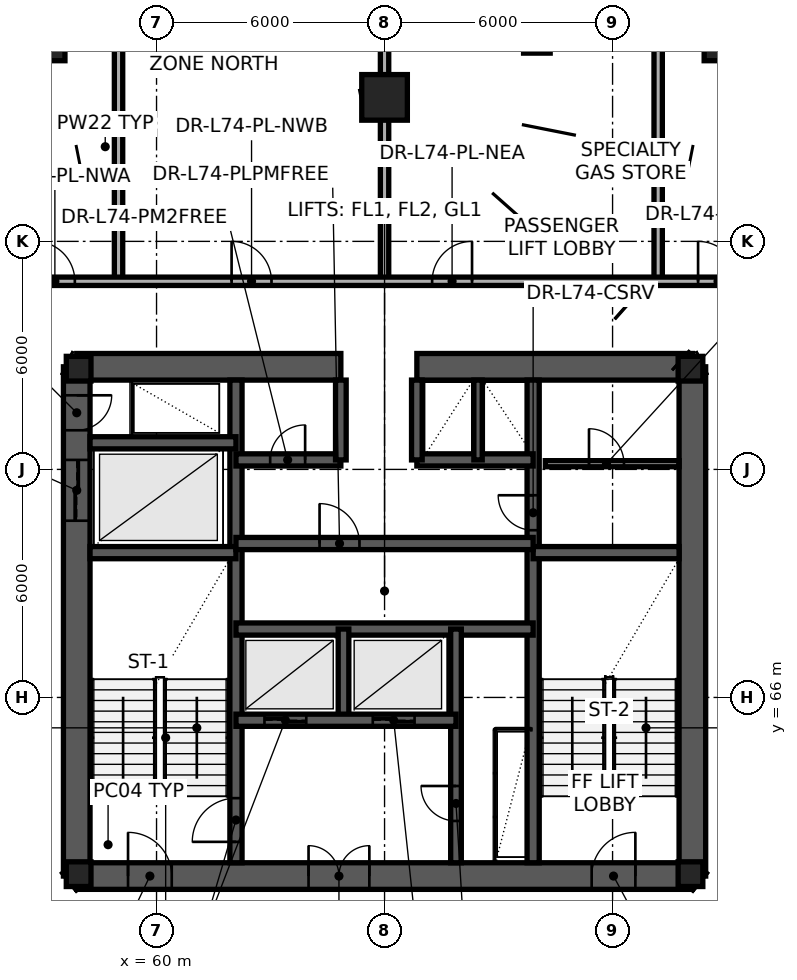
"""IFC4 building model, lengths in metres.
Left out: names, types, materials, properties, quantities, classifications, styles, units other than length and angle.
Written with IfcOpenShell. Run it as: python <this file> out.ifc"""

import sys

from ifc_helpers import new_model, si_unit, direction, frame, frame_2d, origin, origin_2d, place, context, subcontext, project, spatial, rectangle, extrude, element, fill, save


model = new_model("IFC4")
c1 = context("Model", 3, precision=1e-05, world=origin(), true_north=direction((0.0, 1.0)))
c2 = subcontext(c1, "Body", "Model", "MODEL_VIEW")
j1 = project(units=[si_unit("LENGTHUNIT", "METRE"), si_unit("PLANEANGLEUNIT", "RADIAN")], contexts=[c1])
p1 = place(None, origin())
s1 = spatial("IfcSite", under=j1, at=p1, CompositionType="ELEMENT")
p2 = place(p1, origin())
s2 = spatial("IfcBuilding", under=s1, at=p2, CompositionType="ELEMENT")
p3 = place(p2, frame((0.0, 0.0, 279.6)))
s3 = spatial("IfcBuildingStorey", under=s2, at=p3, CompositionType="ELEMENT", Elevation=279.6)
p4 = place(p3, frame((57.9, 61.3, 0.0), z_axis=(0.0, 0.0, 1.0), x_axis=(1.0, 0.0, 0.0)))
e1 = element("IfcWall", 1, at=p4, inside=s3, PredefinedType="SHEAR", context=c2, shape_type="SweptSolid", body=[
    extrude(rectangle(XDim=16.2, YDim=0.7, at=frame_2d((8.1, 0.0))), origin(), (0.0, 0.0, 1.0), 4.2),
])
p5 = place(p4, frame((1.35, 0.0, 0.0)))
e2 = element("IfcOpeningElement", 2, at=p5, cuts=e1, PredefinedType="OPENING", context=c2, shape_type="SweptSolid", body=[
    extrude(rectangle(XDim=1.15, YDim=2.15, at=frame_2d((0.575, 1.075))), frame((0.0, 0.36, 0.0), z_axis=(0.0, -1.0, 0.0), x_axis=(1.0, 0.0, 0.0)), (0.0, 0.0, 1.0), 0.72),
])
p6 = place(p4, frame((6.1, 0.0, 0.0)))
e3 = element("IfcOpeningElement", 3, at=p6, cuts=e1, PredefinedType="OPENING", context=c2, shape_type="SweptSolid", body=[
    extrude(rectangle(XDim=1.6, YDim=2.15, at=frame_2d((0.8, 1.075))), frame((0.0, 0.36, 0.0), z_axis=(0.0, -1.0, 0.0), x_axis=(1.0, 0.0, 0.0)), (0.0, 0.0, 1.0), 0.72),
])
p7 = place(p4, frame((13.55, 0.0, 0.0)))
e4 = element("IfcOpeningElement", 4, at=p7, cuts=e1, PredefinedType="OPENING", context=c2, shape_type="SweptSolid", body=[
    extrude(rectangle(XDim=1.15, YDim=2.15, at=frame_2d((0.575, 1.075))), frame((0.0, 0.36, 0.0), z_axis=(0.0, -1.0, 0.0), x_axis=(1.0, 0.0, 0.0)), (0.0, 0.0, 1.0), 0.72),
])
p8 = place(p3, frame((74.1, 61.3, 0.0), z_axis=(0.0, 0.0, 1.0), x_axis=(0.0, 1.0, 0.0)))
e5 = element("IfcWall", 5, at=p8, inside=s3, PredefinedType="SHEAR", context=c2, shape_type="SweptSolid", body=[
    extrude(rectangle(XDim=13.4, YDim=0.7, at=frame_2d((6.7, 0.0))), origin(), (0.0, 0.0, 1.0), 4.2),
])
p9 = place(p3, frame((74.1, 74.7, 0.0), z_axis=(0.0, 0.0, 1.0), x_axis=(-1.0, 0.0, 0.0)))
e6 = element("IfcWall", 6, at=p9, inside=s3, PredefinedType="SHEAR", context=c2, shape_type="SweptSolid", body=[
    extrude(rectangle(XDim=7.25, YDim=0.7, at=frame_2d((3.625, 0.0))), origin(), (0.0, 0.0, 1.0), 4.2),
])
p10 = place(p3, frame((64.85, 74.7, 0.0), z_axis=(0.0, 0.0, 1.0), x_axis=(-1.0, 0.0, 0.0)))
e7 = element("IfcWall", 7, at=p10, inside=s3, PredefinedType="SHEAR", context=c2, shape_type="SweptSolid", body=[
    extrude(rectangle(XDim=6.95, YDim=0.7, at=frame_2d((3.475, 0.0))), origin(), (0.0, 0.0, 1.0), 4.2),
])
p11 = place(p3, frame((57.9, 74.7, 0.0), z_axis=(0.0, 0.0, 1.0), x_axis=(0.0, -1.0, 0.0)))
e8 = element("IfcWall", 8, at=p11, inside=s3, PredefinedType="SHEAR", context=c2, shape_type="SweptSolid", body=[
    extrude(rectangle(XDim=13.4, YDim=0.7, at=frame_2d((6.7, 0.0))), origin(), (0.0, 0.0, 1.0), 4.2),
])
p12 = place(p11, frame((0.75, 0.0, 0.0)))
e9 = element("IfcOpeningElement", 9, at=p12, cuts=e8, PredefinedType="OPENING", context=c2, shape_type="SweptSolid", body=[
    extrude(rectangle(XDim=0.92, YDim=2.05, at=frame_2d((0.46, 1.025))), frame((0.0, 0.36, 0.0), z_axis=(0.0, -1.0, 0.0), x_axis=(1.0, 0.0, 0.0)), (0.0, 0.0, 1.0), 0.72),
])
p13 = place(p11, frame((2.45, 0.0, 0.0)))
e10 = element("IfcOpeningElement", 10, at=p13, cuts=e8, PredefinedType="OPENING", context=c2, shape_type="SweptSolid", body=[
    extrude(rectangle(XDim=1.6, YDim=2.3, at=frame_2d((0.8, 1.15))), frame((0.0, 0.36, 0.0), z_axis=(0.0, -1.0, 0.0), x_axis=(1.0, 0.0, 0.0)), (0.0, 0.0, 1.0), 0.72),
])
p14 = place(p3, frame((62.09, 61.65, 0.0), z_axis=(0.0, 0.0, 1.0), x_axis=(0.0, 1.0, 0.0)))
e11 = element("IfcWall", 11, at=p14, inside=s3, PredefinedType="SHEAR", context=c2, shape_type="SweptSolid", body=[
    extrude(rectangle(XDim=12.7, YDim=0.32, at=frame_2d((6.35, 0.0))), origin(), (0.0, 0.0, 1.0), 4.2),
])
p15 = place(p14, frame((0.55, 0.0, 0.0)))
e12 = element("IfcOpeningElement", 12, at=p15, cuts=e11, PredefinedType="OPENING", context=c2, shape_type="SweptSolid", body=[
    extrude(rectangle(XDim=1.15, YDim=2.15, at=frame_2d((0.575, 1.075))), frame((0.0, 0.17, 0.0), z_axis=(0.0, -1.0, 0.0), x_axis=(1.0, 0.0, 0.0)), (0.0, 0.0, 1.0), 0.34),
])
p16 = place(p3, frame((69.91, 61.65, 0.0), z_axis=(0.0, 0.0, 1.0), x_axis=(0.0, 1.0, 0.0)))
e13 = element("IfcWall", 13, at=p16, inside=s3, PredefinedType="SHEAR", context=c2, shape_type="SweptSolid", body=[
    extrude(rectangle(XDim=12.7, YDim=0.32, at=frame_2d((6.35, 0.0))), origin(), (0.0, 0.0, 1.0), 4.2),
])
p17 = place(p16, frame((8.75, 0.0, 0.0)))
e14 = element("IfcOpeningElement", 14, at=p17, cuts=e13, PredefinedType="OPENING", context=c2, shape_type="SweptSolid", body=[
    extrude(rectangle(XDim=0.92, YDim=2.05, at=frame_2d((0.46, 1.025))), frame((0.0, 0.17, 0.0), z_axis=(0.0, -1.0, 0.0), x_axis=(1.0, 0.0, 0.0)), (0.0, 0.0, 1.0), 0.34),
])
for number, where, z_axis, x_axis in (
    (15, (58.25, 69.81, 0.0), (0.0, 0.0, 1.0), (1.0, 0.0, 0.0)),
    (16, (69.91, 69.81, 0.0), (0.0, 0.0, 1.0), (1.0, 0.0, 0.0)),
    (17, (58.25, 72.7, 0.0), (0.0, 0.0, 1.0), (1.0, 0.0, 0.0)),
):
    element("IfcWall", number, at=place(p3, frame(where, z_axis=z_axis, x_axis=x_axis)), inside=s3, PredefinedType="SHEAR", context=c2, shape_type="SweptSolid", body=[
        extrude(rectangle(XDim=3.84, YDim=0.32, at=frame_2d((1.92, 0.0))), origin(), (0.0, 0.0, 1.0), 4.2),
    ])
p18 = place(p3, frame((62.09, 67.8, 0.0), z_axis=(0.0, 0.0, 1.0), x_axis=(1.0, 0.0, 0.0)))
e18 = element("IfcWall", 18, at=p18, inside=s3, PredefinedType="SHEAR", context=c2, shape_type="SweptSolid", body=[
    extrude(rectangle(XDim=7.82, YDim=0.32, at=frame_2d((3.91, 0.0))), origin(), (0.0, 0.0, 1.0), 4.2),
])
p19 = place(p3, frame((64.92, 65.4, 0.0), z_axis=(0.0, 0.0, 1.0), x_axis=(0.0, 1.0, 0.0)))
e19 = element("IfcWall", 19, at=p19, inside=s3, PredefinedType="SHEAR", context=c2, shape_type="SweptSolid", body=[
    extrude(rectangle(XDim=2.4, YDim=0.28, at=frame_2d((1.2, 0.0))), origin(), (0.0, 0.0, 1.0), 4.2),
])
p20 = place(p3, frame((62.09, 70.05, 0.0), z_axis=(0.0, 0.0, 1.0), x_axis=(1.0, 0.0, 0.0)))
e20 = element("IfcWall", 20, at=p20, inside=s3, PredefinedType="SHEAR", context=c2, shape_type="SweptSolid", body=[
    extrude(rectangle(XDim=7.82, YDim=0.32, at=frame_2d((3.91, 0.0))), origin(), (0.0, 0.0, 1.0), 4.2),
])
p21 = place(p20, frame((2.2, 0.0, 0.0)))
e21 = element("IfcOpeningElement", 21, at=p21, cuts=e20, PredefinedType="OPENING", context=c2, shape_type="SweptSolid", body=[
    extrude(rectangle(XDim=1.05, YDim=2.15, at=frame_2d((0.525, 1.075))), frame((0.0, 0.17, 0.0), z_axis=(0.0, -1.0, 0.0), x_axis=(1.0, 0.0, 0.0)), (0.0, 0.0, 1.0), 0.34),
])
p22 = place(p3, frame((62.09, 72.25, 0.0), z_axis=(0.0, 0.0, 1.0), x_axis=(1.0, 0.0, 0.0)))
e22 = element("IfcWall", 22, at=p22, inside=s3, PredefinedType="SHEAR", context=c2, shape_type="SweptSolid", body=[
    extrude(rectangle(XDim=2.76, YDim=0.32, at=frame_2d((1.38, 0.0))), origin(), (0.0, 0.0, 1.0), 4.2),
])
p23 = place(p22, frame((0.9, 0.0, 0.0)))
e23 = element("IfcOpeningElement", 23, at=p23, cuts=e22, PredefinedType="OPENING", context=c2, shape_type="SweptSolid", body=[
    extrude(rectangle(XDim=0.92, YDim=2.05, at=frame_2d((0.46, 1.025))), frame((0.0, 0.17, 0.0), z_axis=(0.0, -1.0, 0.0), x_axis=(1.0, 0.0, 0.0)), (0.0, 0.0, 1.0), 0.34),
])
p24 = place(p3, frame((66.85, 72.25, 0.0), z_axis=(0.0, 0.0, 1.0), x_axis=(1.0, 0.0, 0.0)))
e24 = element("IfcWall", 24, at=p24, inside=s3, PredefinedType="SHEAR", context=c2, shape_type="SweptSolid", body=[
    extrude(rectangle(XDim=3.06, YDim=0.32, at=frame_2d((1.53, 0.0))), origin(), (0.0, 0.0, 1.0), 4.2),
])
for number, where, z_axis, x_axis in (
    (25, (64.85, 72.25, 0.0), (0.0, 0.0, 1.0), (0.0, 1.0, 0.0)),
    (26, (66.85, 72.25, 0.0), (0.0, 0.0, 1.0), (0.0, 1.0, 0.0)),
):
    element("IfcWall", number, at=place(p3, frame(where, z_axis=z_axis, x_axis=x_axis)), inside=s3, PredefinedType="SHEAR", context=c2, shape_type="SweptSolid", body=[
        extrude(rectangle(XDim=2.1, YDim=0.28, at=frame_2d((1.05, 0.0))), origin(), (0.0, 0.0, 1.0), 4.2),
    ])
p25 = place(p3, frame((68.46, 72.25, 0.0), z_axis=(0.0, 0.0, 1.0), x_axis=(0.0, 1.0, 0.0)))
e27 = element("IfcWall", 27, at=p25, inside=s3, PredefinedType="SHEAR", context=c2, shape_type="SweptSolid", body=[
    extrude(rectangle(XDim=2.1, YDim=0.22, at=frame_2d((1.05, 0.0))), origin(), (0.0, 0.0, 1.0), 4.2),
])
p26 = place(p3, frame((67.88, 61.65, 0.0), z_axis=(0.0, 0.0, 1.0), x_axis=(0.0, 1.0, 0.0)))
e28 = element("IfcWall", 28, at=p26, inside=s3, PredefinedType="SHEAR", context=c2, shape_type="SweptSolid", body=[
    extrude(rectangle(XDim=6.15, YDim=0.28, at=frame_2d((3.075, 0.0))), origin(), (0.0, 0.0, 1.0), 4.2),
])
p27 = place(p26, frame((1.1, 0.0, 0.0)))
e29 = element("IfcOpeningElement", 29, at=p27, cuts=e28, PredefinedType="OPENING", context=c2, shape_type="SweptSolid", body=[
    extrude(rectangle(XDim=0.92, YDim=2.05, at=frame_2d((0.46, 1.025))), frame((0.0, 0.15, 0.0), z_axis=(0.0, -1.0, 0.0), x_axis=(1.0, 0.0, 0.0)), (0.0, 0.0, 1.0), 0.3),
])
p28 = place(p3, frame((62.09, 65.4, 0.0), z_axis=(0.0, 0.0, 1.0), x_axis=(1.0, 0.0, 0.0)))
e30 = element("IfcWall", 30, at=p28, inside=s3, PredefinedType="SHEAR", context=c2, shape_type="SweptSolid", body=[
    extrude(rectangle(XDim=5.79, YDim=0.32, at=frame_2d((2.895, 0.0))), origin(), (0.0, 0.0, 1.0), 4.2),
])
p29 = place(p28, frame((0.75, 0.0, 0.0)))
e31 = element("IfcOpeningElement", 31, at=p29, cuts=e30, PredefinedType="OPENING", context=c2, shape_type="SweptSolid", body=[
    extrude(rectangle(XDim=1.1, YDim=2.2, at=frame_2d((0.55, 1.1))), frame((0.0, 0.17, 0.0), z_axis=(0.0, -1.0, 0.0), x_axis=(1.0, 0.0, 0.0)), (0.0, 0.0, 1.0), 0.34),
])
p30 = place(p28, frame((3.6, 0.0, 0.0)))
e32 = element("IfcOpeningElement", 32, at=p30, cuts=e30, PredefinedType="OPENING", context=c2, shape_type="SweptSolid", body=[
    extrude(rectangle(XDim=1.1, YDim=2.2, at=frame_2d((0.55, 1.1))), frame((0.0, 0.17, 0.0), z_axis=(0.0, -1.0, 0.0), x_axis=(1.0, 0.0, 0.0)), (0.0, 0.0, 1.0), 0.34),
])
for number, where, z_axis, x_axis in (
    (33, (57.95, 61.35, 0.0), (0.0, 0.0, 1.0), (1.0, 0.0, 0.0)),
    (34, (74.05, 61.35, 0.0), (0.0, 0.0, 1.0), (1.0, 0.0, 0.0)),
    (35, (74.05, 74.65, 0.0), (0.0, 0.0, 1.0), (1.0, 0.0, 0.0)),
    (36, (57.95, 74.65, 0.0), (0.0, 0.0, 1.0), (1.0, 0.0, 0.0)),
):
    element("IfcColumn", number, at=place(p3, frame(where, z_axis=z_axis, x_axis=x_axis)), inside=s3, PredefinedType="COLUMN", context=c2, shape_type="SweptSolid", body=[
        extrude(rectangle(XDim=0.65, YDim=0.65, at=origin_2d()), origin(), (0.0, 0.0, 1.0), 4.2),
    ])
p31 = place(p3, frame((66.0, 81.789, 0.0), z_axis=(0.0, 0.0, 1.0), x_axis=(1.0, 0.0, 0.0)))
e37 = element("IfcColumn", 37, at=p31, inside=s3, PredefinedType="COLUMN", context=c2, shape_type="SweptSolid", body=[
    extrude(rectangle(XDim=1.2, YDim=1.2, at=origin_2d()), origin(), (0.0, 0.0, 1.0), 4.2),
])
p32 = place(p3, frame((74.734, 83.09, 0.003), z_axis=(-0.023326184215, -0.02914318776, 0.999303038991), x_axis=(-0.780716755404, 0.624885067698, 0.0)))
e38 = element("IfcColumn", 38, at=p32, inside=s3, PredefinedType="COLUMN", context=c2, shape_type="SweptSolid", body=[
    extrude(rectangle(XDim=0.55, YDim=0.55, at=origin_2d()), origin(), (0.0, 0.0, 1.0), 4.197),
])
p33 = place(p3, frame((70.031, 83.189, 0.003), z_axis=(-0.010763761875, -0.029149430808, 0.999517109465), x_axis=(-0.9380871136, 0.346399433166, 0.0)))
e39 = element("IfcColumn", 39, at=p33, inside=s3, PredefinedType="PILASTER", context=c2, shape_type="SweptSolid", body=[
    extrude(rectangle(XDim=0.7, YDim=0.35, at=origin_2d()), origin(), (0.0, 0.0, 1.0), 4.196),
])
p34 = place(p3, frame((57.266, 83.09, 0.003), z_axis=(0.023326184215, -0.02914318776, 0.999303038991), x_axis=(-0.780716755404, -0.624885067698, 0.0)))
e40 = element("IfcColumn", 40, at=p34, inside=s3, PredefinedType="COLUMN", context=c2, shape_type="SweptSolid", body=[
    extrude(rectangle(XDim=0.55, YDim=0.55, at=origin_2d()), origin(), (0.0, 0.0, 1.0), 4.197),
])
p35 = place(p3, frame((70.23, 72.15, 0.0), z_axis=(0.0, 0.0, 1.0), x_axis=(1.0, 0.0, 0.0)))
e41 = element("IfcWall", 41, at=p35, inside=s3, PredefinedType="PARTITIONING", context=c2, shape_type="SweptSolid", body=[
    extrude(rectangle(XDim=3.52, YDim=0.16, at=frame_2d((1.76, 0.0))), origin(), (0.0, 0.0, 1.0), 3.95),
])
p36 = place(p35, frame((1.15, 0.0, 0.0)))
e42 = element("IfcOpeningElement", 42, at=p36, cuts=e41, PredefinedType="OPENING", context=c2, shape_type="SweptSolid", body=[
    extrude(rectangle(XDim=0.92, YDim=2.05, at=frame_2d((0.46, 1.025))), frame((0.0, 0.09, 0.0), z_axis=(0.0, -1.0, 0.0), x_axis=(1.0, 0.0, 0.0)), (0.0, 0.0, 1.0), 0.18),
])
for number, where, z_axis, x_axis in (
    (43, (59.0, 76.95, 0.0), (0.0, 0.0, 1.0), (0.0, 1.0, 0.0)),
    (44, (66.0, 76.95, 0.0), (0.0, 0.0, 1.0), (0.0, 1.0, 0.0)),
    (45, (73.2, 76.95, 0.0), (0.0, 0.0, 1.0), (0.0, 1.0, 0.0)),
):
    element("IfcWall", number, at=place(p3, frame(where, z_axis=z_axis, x_axis=x_axis)), inside=s3, PredefinedType="PARTITIONING", context=c2, shape_type="SweptSolid", body=[
        extrude(rectangle(XDim=7.082, YDim=0.22, at=frame_2d((3.541, 0.0))), origin(), (0.0, 0.0, 1.0), 3.23),
    ])
p37 = place(p3, frame((55.65, 76.95, 0.0), z_axis=(0.0, 0.0, 1.0), x_axis=(1.0, 0.0, 0.0)))
e46 = element("IfcWall", 46, at=p37, inside=s3, PredefinedType="PARTITIONING", context=c2, shape_type="SweptSolid", body=[
    extrude(rectangle(XDim=20.7, YDim=0.22, at=frame_2d((10.35, 0.0))), origin(), (0.0, 0.0, 1.0), 3.43),
])
p38 = place(p37, frame((1.15, 0.0, 0.0)))
e47 = element("IfcOpeningElement", 47, at=p38, cuts=e46, PredefinedType="OPENING", context=c2, shape_type="SweptSolid", body=[
    extrude(rectangle(XDim=1.05, YDim=2.15, at=frame_2d((0.525, 1.075))), frame((0.0, 0.12, 0.0), z_axis=(0.0, -1.0, 0.0), x_axis=(1.0, 0.0, 0.0)), (0.0, 0.0, 1.0), 0.24),
])
p39 = place(p37, frame((6.325, 0.0, 0.0)))
e48 = element("IfcOpeningElement", 48, at=p39, cuts=e46, PredefinedType="OPENING", context=c2, shape_type="SweptSolid", body=[
    extrude(rectangle(XDim=1.05, YDim=2.15, at=frame_2d((0.525, 1.075))), frame((0.0, 0.12, 0.0), z_axis=(0.0, -1.0, 0.0), x_axis=(1.0, 0.0, 0.0)), (0.0, 0.0, 1.0), 0.24),
])
p40 = place(p37, frame((11.602, 0.0, 0.0)))
e49 = element("IfcOpeningElement", 49, at=p40, cuts=e46, PredefinedType="OPENING", context=c2, shape_type="SweptSolid", body=[
    extrude(rectangle(XDim=1.05, YDim=2.15, at=frame_2d((0.525, 1.075))), frame((0.0, 0.12, 0.0), z_axis=(0.0, -1.0, 0.0), x_axis=(1.0, 0.0, 0.0)), (0.0, 0.0, 1.0), 0.24),
])
p41 = place(p37, frame((18.6, 0.0, 0.0)))
e50 = element("IfcOpeningElement", 50, at=p41, cuts=e46, PredefinedType="OPENING", context=c2, shape_type="SweptSolid", body=[
    extrude(rectangle(XDim=1.05, YDim=2.15, at=frame_2d((0.525, 1.075))), frame((0.0, 0.12, 0.0), z_axis=(0.0, -1.0, 0.0), x_axis=(1.0, 0.0, 0.0)), (0.0, 0.0, 1.0), 0.24),
])
p42 = place(p15, origin())
e51 = element("IfcDoor", 51, at=p42, inside=s3, OperationType="SINGLE_SWING_LEFT", PredefinedType="DOOR", context=c2, shape_type="SweptSolid", body=[
    extrude(rectangle(XDim=1.15, YDim=2.15, at=frame_2d((0.575, 1.075))), frame((0.0, 0.025, 0.0), z_axis=(0.0, -1.0, 0.0), x_axis=(1.0, 0.0, 0.0)), (0.0, 0.0, 1.0), 0.05),
])
fill(e12, e51)
p43 = place(p27, origin())
e52 = element("IfcDoor", 52, at=p43, inside=s3, OperationType="SINGLE_SWING_RIGHT", PredefinedType="DOOR", context=c2, shape_type="SweptSolid", body=[
    extrude(rectangle(XDim=0.92, YDim=2.05, at=frame_2d((0.46, 1.025))), frame((0.0, 0.025, 0.0), z_axis=(0.0, -1.0, 0.0), x_axis=(1.0, 0.0, 0.0)), (0.0, 0.0, 1.0), 0.05),
])
fill(e29, e52)
p44 = place(p29, origin())
e53 = element("IfcDoor", 53, at=p44, inside=s3, OperationType="SLIDING_TO_LEFT", PredefinedType="DOOR", context=c2, shape_type="SweptSolid", body=[
    extrude(rectangle(XDim=1.1, YDim=2.2, at=frame_2d((0.55, 1.1))), frame((0.0, 0.025, 0.0), z_axis=(0.0, -1.0, 0.0), x_axis=(1.0, 0.0, 0.0)), (0.0, 0.0, 1.0), 0.05),
])
fill(e31, e53)
p45 = place(p30, origin())
e54 = element("IfcDoor", 54, at=p45, inside=s3, OperationType="SLIDING_TO_LEFT", PredefinedType="DOOR", context=c2, shape_type="SweptSolid", body=[
    extrude(rectangle(XDim=1.1, YDim=2.2, at=frame_2d((0.55, 1.1))), frame((0.0, 0.025, 0.0), z_axis=(0.0, -1.0, 0.0), x_axis=(1.0, 0.0, 0.0)), (0.0, 0.0, 1.0), 0.05),
])
fill(e32, e54)
p46 = place(p21, origin())
e55 = element("IfcDoor", 55, at=p46, inside=s3, OperationType="SINGLE_SWING_LEFT", PredefinedType="DOOR", context=c2, shape_type="SweptSolid", body=[
    extrude(rectangle(XDim=1.05, YDim=2.15, at=frame_2d((0.525, 1.075))), frame((0.0, 0.025, 0.0), z_axis=(0.0, -1.0, 0.0), x_axis=(1.0, 0.0, 0.0)), (0.0, 0.0, 1.0), 0.05),
])
fill(e21, e55)
p47 = place(p23, origin())
e56 = element("IfcDoor", 56, at=p47, inside=s3, OperationType="SINGLE_SWING_RIGHT", PredefinedType="DOOR", context=c2, shape_type="SweptSolid", body=[
    extrude(rectangle(XDim=0.92, YDim=2.05, at=frame_2d((0.46, 1.025))), frame((0.0, 0.025, 0.0), z_axis=(0.0, -1.0, 0.0), x_axis=(1.0, 0.0, 0.0)), (0.0, 0.0, 1.0), 0.05),
])
fill(e23, e56)
p48 = place(p5, origin())
e57 = element("IfcDoor", 57, at=p48, inside=s3, OperationType="SINGLE_SWING_LEFT", PredefinedType="DOOR", context=c2, shape_type="SweptSolid", body=[
    extrude(rectangle(XDim=1.15, YDim=2.15, at=frame_2d((0.575, 1.075))), frame((0.0, 0.025, 0.0), z_axis=(0.0, -1.0, 0.0), x_axis=(1.0, 0.0, 0.0)), (0.0, 0.0, 1.0), 0.05),
])
fill(e2, e57)
p49 = place(p6, origin())
e58 = element("IfcDoor", 58, at=p49, inside=s3, OperationType="DOUBLE_DOOR_SINGLE_SWING", PredefinedType="DOOR", context=c2, shape_type="SweptSolid", body=[
    extrude(rectangle(XDim=1.6, YDim=2.15, at=frame_2d((0.8, 1.075))), frame((0.0, 0.025, 0.0), z_axis=(0.0, -1.0, 0.0), x_axis=(1.0, 0.0, 0.0)), (0.0, 0.0, 1.0), 0.05),
])
fill(e3, e58)
p50 = place(p7, origin())
e59 = element("IfcDoor", 59, at=p50, inside=s3, OperationType="SINGLE_SWING_RIGHT", PredefinedType="DOOR", context=c2, shape_type="SweptSolid", body=[
    extrude(rectangle(XDim=1.15, YDim=2.15, at=frame_2d((0.575, 1.075))), frame((0.0, 0.025, 0.0), z_axis=(0.0, -1.0, 0.0), x_axis=(1.0, 0.0, 0.0)), (0.0, 0.0, 1.0), 0.05),
])
fill(e4, e59)
p51 = place(p12, origin())
e60 = element("IfcDoor", 60, at=p51, inside=s3, OperationType="SINGLE_SWING_LEFT", PredefinedType="DOOR", context=c2, shape_type="SweptSolid", body=[
    extrude(rectangle(XDim=0.92, YDim=2.05, at=frame_2d((0.46, 1.025))), frame((0.0, 0.025, 0.0), z_axis=(0.0, -1.0, 0.0), x_axis=(1.0, 0.0, 0.0)), (0.0, 0.0, 1.0), 0.05),
])
fill(e9, e60)
p52 = place(p13, origin())
e61 = element("IfcDoor", 61, at=p52, inside=s3, OperationType="DOUBLE_DOOR_SLIDING", PredefinedType="DOOR", context=c2, shape_type="SweptSolid", body=[
    extrude(rectangle(XDim=1.6, YDim=2.3, at=frame_2d((0.8, 1.15))), frame((0.0, 0.025, 0.0), z_axis=(0.0, -1.0, 0.0), x_axis=(1.0, 0.0, 0.0)), (0.0, 0.0, 1.0), 0.05),
])
fill(e10, e61)
p53 = place(p17, origin())
e62 = element("IfcDoor", 62, at=p53, inside=s3, OperationType="SINGLE_SWING_RIGHT", PredefinedType="DOOR", context=c2, shape_type="SweptSolid", body=[
    extrude(rectangle(XDim=0.92, YDim=2.05, at=frame_2d((0.46, 1.025))), frame((0.0, 0.025, 0.0), z_axis=(0.0, -1.0, 0.0), x_axis=(1.0, 0.0, 0.0)), (0.0, 0.0, 1.0), 0.05),
])
fill(e14, e62)
p54 = place(p36, origin())
e63 = element("IfcDoor", 63, at=p54, inside=s3, OperationType="SINGLE_SWING_LEFT", PredefinedType="DOOR", context=c2, shape_type="SweptSolid", body=[
    extrude(rectangle(XDim=0.92, YDim=2.05, at=frame_2d((0.46, 1.025))), frame((0.0, 0.025, 0.0), z_axis=(0.0, -1.0, 0.0), x_axis=(1.0, 0.0, 0.0)), (0.0, 0.0, 1.0), 0.05),
])
fill(e42, e63)
p55 = place(p38, origin())
e64 = element("IfcDoor", 64, at=p55, inside=s3, OperationType="SINGLE_SWING_LEFT", PredefinedType="DOOR", context=c2, shape_type="SweptSolid", body=[
    extrude(rectangle(XDim=1.05, YDim=2.15, at=frame_2d((0.525, 1.075))), frame((0.0, 0.025, 0.0), z_axis=(0.0, -1.0, 0.0), x_axis=(1.0, 0.0, 0.0)), (0.0, 0.0, 1.0), 0.05),
])
fill(e47, e64)
p56 = place(p39, origin())
e65 = element("IfcDoor", 65, at=p56, inside=s3, OperationType="SINGLE_SWING_LEFT", PredefinedType="DOOR", context=c2, shape_type="SweptSolid", body=[
    extrude(rectangle(XDim=1.05, YDim=2.15, at=frame_2d((0.525, 1.075))), frame((0.0, 0.025, 0.0), z_axis=(0.0, -1.0, 0.0), x_axis=(1.0, 0.0, 0.0)), (0.0, 0.0, 1.0), 0.05),
])
fill(e48, e65)
p57 = place(p40, origin())
e66 = element("IfcDoor", 66, at=p57, inside=s3, OperationType="SINGLE_SWING_RIGHT", PredefinedType="DOOR", context=c2, shape_type="SweptSolid", body=[
    extrude(rectangle(XDim=1.05, YDim=2.15, at=frame_2d((0.525, 1.075))), frame((0.0, 0.025, 0.0), z_axis=(0.0, -1.0, 0.0), x_axis=(1.0, 0.0, 0.0)), (0.0, 0.0, 1.0), 0.05),
])
fill(e49, e66)
p58 = place(p41, origin())
e67 = element("IfcDoor", 67, at=p58, inside=s3, OperationType="SINGLE_SWING_LEFT", PredefinedType="DOOR", context=c2, shape_type="SweptSolid", body=[
    extrude(rectangle(XDim=1.05, YDim=2.15, at=frame_2d((0.525, 1.075))), frame((0.0, 0.025, 0.0), z_axis=(0.0, -1.0, 0.0), x_axis=(1.0, 0.0, 0.0)), (0.0, 0.0, 1.0), 0.05),
])
fill(e50, e67)
save(model, sys.argv[1])
